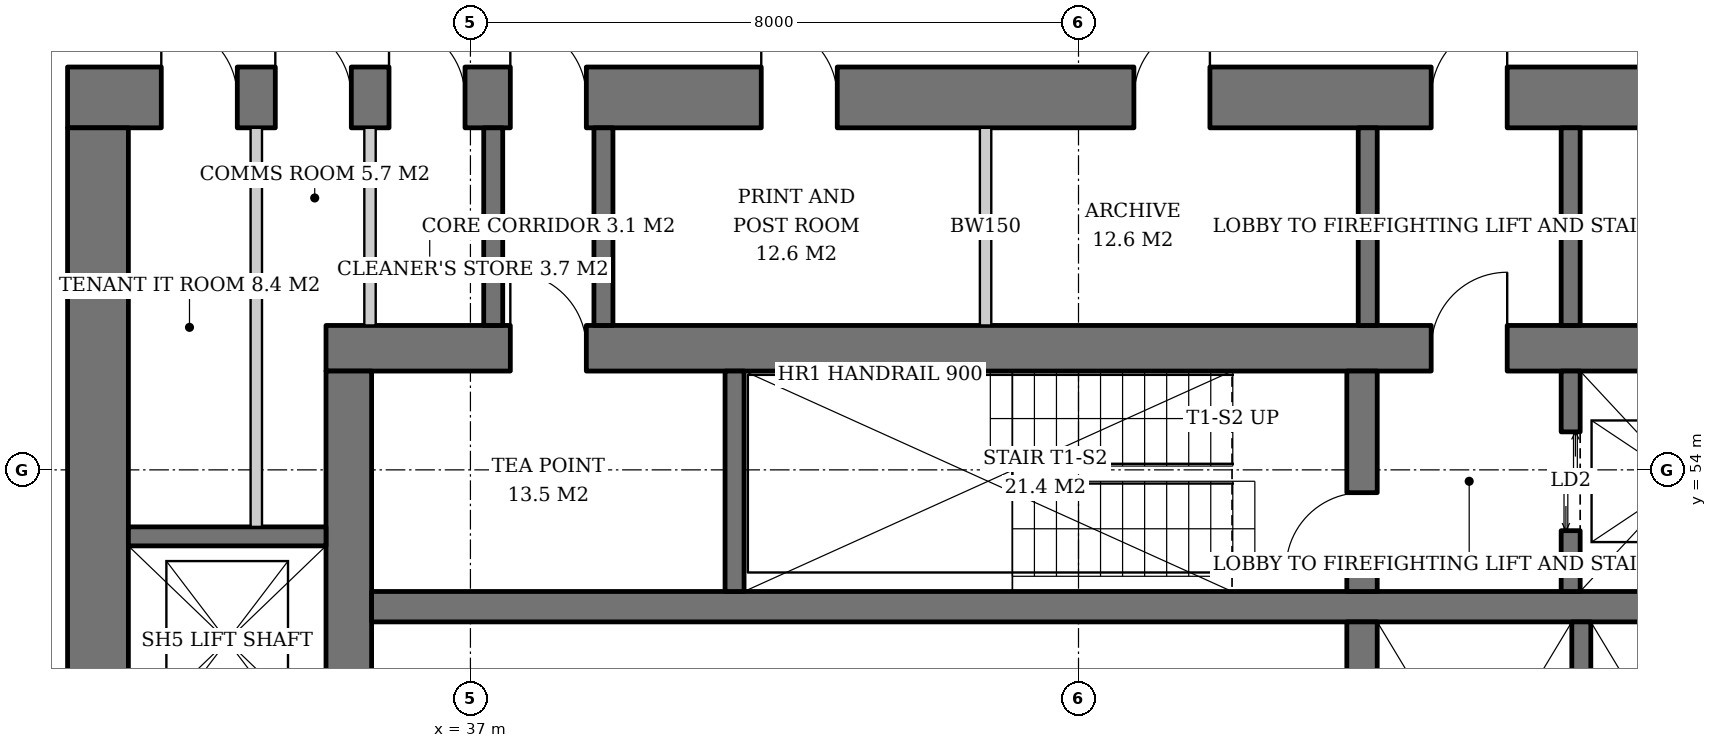
"""IFC4 building model, lengths in metres.
Left out: names, types, materials, properties, quantities, classifications, styles, units other than length and angle.
Written with IfcOpenShell. Run it as: python <this file> out.ifc"""

import sys

from ifc_helpers import new_model, si_unit, direction, frame, frame_2d, origin, place, context, subcontext, project, spatial, rectangle, extrude, element, fill, save


model = new_model("IFC4")
c1 = context("Model", 3, precision=1e-05, world=origin(), true_north=direction((0.0, 1.0)))
c2 = subcontext(c1, "Body", "Model", "MODEL_VIEW")
j1 = project(units=[si_unit("LENGTHUNIT", "METRE"), si_unit("PLANEANGLEUNIT", "RADIAN")], contexts=[c1])
p1 = place(None, origin())
s1 = spatial("IfcSite", under=j1, at=p1, CompositionType="ELEMENT")
p2 = place(p1, origin())
s2 = spatial("IfcBuilding", under=s1, at=p2, CompositionType="ELEMENT")
p3 = place(p2, frame((0.0, 0.0, 47.6)))
s3 = spatial("IfcBuildingStorey", under=s2, at=p3, CompositionType="ELEMENT", Elevation=47.6)
p4 = place(p3, frame((35.1, 55.6, 0.0), z_axis=(0.0, 0.0, 1.0), x_axis=(1.0, 0.0, 0.0)))
e1 = element("IfcWall", 1, at=p4, inside=s3, PredefinedType="SHEAR", context=c2, shape_type="SweptSolid", body=[
    extrude(rectangle(XDim=19.8, YDim=0.6, at=frame_2d((9.9, 0.0))), origin(), (0.0, 0.0, 1.0), 3.8),
])
p5 = place(p4, frame((14.54, 0.0, 0.0)))
e2 = element("IfcOpeningElement", 2, at=p5, cuts=e1, PredefinedType="OPENING", context=c2, shape_type="SweptSolid", body=[
    extrude(rectangle(XDim=1.0, YDim=2.1, at=frame_2d((0.5, 1.05))), frame((0.0, 0.31, 0.0), z_axis=(0.0, -1.0, 0.0), x_axis=(1.0, 0.0, 0.0)), (0.0, 0.0, 1.0), 0.62),
])
p6 = place(p4, frame((2.425, 0.0, 0.0)))
e3 = element("IfcOpeningElement", 3, at=p6, cuts=e1, PredefinedType="OPENING", context=c2, shape_type="SweptSolid", body=[
    extrude(rectangle(XDim=1.0, YDim=2.1, at=frame_2d((0.5, 1.05))), frame((0.0, 0.31, 0.0), z_axis=(0.0, -1.0, 0.0), x_axis=(1.0, 0.0, 0.0)), (0.0, 0.0, 1.0), 0.62),
])
p7 = place(p3, frame((35.4, 36.7, 0.0), z_axis=(0.0, 0.0, 1.0), x_axis=(0.0, 1.0, 0.0)))
e4 = element("IfcWall", 4, at=p7, inside=s3, PredefinedType="SHEAR", context=c2, shape_type="SweptSolid", body=[
    extrude(rectangle(XDim=18.6, YDim=0.6, at=frame_2d((9.3, 0.0))), origin(), (0.0, 0.0, 1.0), 3.8),
])
p8 = place(p7, frame((8.4, 0.0, 0.0)))
e5 = element("IfcOpeningElement", 5, at=p8, cuts=e4, PredefinedType="OPENING", context=c2, shape_type="SweptSolid", body=[
    extrude(rectangle(XDim=1.8, YDim=2.4, at=frame_2d((0.9, 1.2))), frame((0.0, 0.31, 0.0), z_axis=(0.0, -1.0, 0.0), x_axis=(1.0, 0.0, 0.0)), (0.0, 0.0, 1.0), 0.62),
])
p9 = place(p3, frame((31.7, 58.9, 0.0), z_axis=(0.0, 0.0, 1.0), x_axis=(1.0, 0.0, 0.0)))
e6 = element("IfcWall", 6, at=p9, inside=s3, PredefinedType="SHEAR", context=c2, shape_type="SweptSolid", body=[
    extrude(rectangle(XDim=26.6, YDim=0.8, at=frame_2d((13.3, 0.0))), origin(), (0.0, 0.0, 1.0), 3.8),
])
p10 = place(p9, frame((17.94, 0.0, 0.0)))
e7 = element("IfcOpeningElement", 7, at=p10, cuts=e6, PredefinedType="OPENING", context=c2, shape_type="SweptSolid", body=[
    extrude(rectangle(XDim=1.0, YDim=2.1, at=frame_2d((0.5, 1.05))), frame((0.0, 0.41, 0.0), z_axis=(0.0, -1.0, 0.0), x_axis=(1.0, 0.0, 0.0)), (0.0, 0.0, 1.0), 0.82),
])
p11 = place(p9, frame((5.825, 0.0, 0.0)))
e8 = element("IfcOpeningElement", 8, at=p11, cuts=e6, PredefinedType="OPENING", context=c2, shape_type="SweptSolid", body=[
    extrude(rectangle(XDim=1.0, YDim=2.1, at=frame_2d((0.5, 1.05))), frame((0.0, 0.41, 0.0), z_axis=(0.0, -1.0, 0.0), x_axis=(1.0, 0.0, 0.0)), (0.0, 0.0, 1.0), 0.82),
])
p12 = place(p9, frame((1.233, 0.0, 0.0)))
e9 = element("IfcOpeningElement", 9, at=p12, cuts=e6, PredefinedType="OPENING", context=c2, shape_type="SweptSolid", body=[
    extrude(rectangle(XDim=1.0, YDim=2.1, at=frame_2d((0.5, 1.05))), frame((0.0, 0.41, 0.0), z_axis=(0.0, -1.0, 0.0), x_axis=(1.0, 0.0, 0.0)), (0.0, 0.0, 1.0), 0.82),
])
p13 = place(p9, frame((2.733, 0.0, 0.0)))
e10 = element("IfcOpeningElement", 10, at=p13, cuts=e6, PredefinedType="OPENING", context=c2, shape_type="SweptSolid", body=[
    extrude(rectangle(XDim=1.0, YDim=2.1, at=frame_2d((0.5, 1.05))), frame((0.0, 0.41, 0.0), z_axis=(0.0, -1.0, 0.0), x_axis=(1.0, 0.0, 0.0)), (0.0, 0.0, 1.0), 0.82),
])
p14 = place(p9, frame((4.229, 0.0, 0.0)))
e11 = element("IfcOpeningElement", 11, at=p14, cuts=e6, PredefinedType="OPENING", context=c2, shape_type="SweptSolid", body=[
    extrude(rectangle(XDim=1.0, YDim=2.1, at=frame_2d((0.5, 1.05))), frame((0.0, 0.41, 0.0), z_axis=(0.0, -1.0, 0.0), x_axis=(1.0, 0.0, 0.0)), (0.0, 0.0, 1.0), 0.82),
])
p15 = place(p9, frame((9.126, 0.0, 0.0)))
e12 = element("IfcOpeningElement", 12, at=p15, cuts=e6, PredefinedType="OPENING", context=c2, shape_type="SweptSolid", body=[
    extrude(rectangle(XDim=1.0, YDim=2.1, at=frame_2d((0.5, 1.05))), frame((0.0, 0.41, 0.0), z_axis=(0.0, -1.0, 0.0), x_axis=(1.0, 0.0, 0.0)), (0.0, 0.0, 1.0), 0.82),
])
p16 = place(p9, frame((14.029, 0.0, 0.0)))
e13 = element("IfcOpeningElement", 13, at=p16, cuts=e6, PredefinedType="OPENING", context=c2, shape_type="SweptSolid", body=[
    extrude(rectangle(XDim=1.0, YDim=2.1, at=frame_2d((0.5, 1.05))), frame((0.0, 0.41, 0.0), z_axis=(0.0, -1.0, 0.0), x_axis=(1.0, 0.0, 0.0)), (0.0, 0.0, 1.0), 0.82),
])
p17 = place(p9, frame((22.35, 0.0, 0.0)))
e14 = element("IfcOpeningElement", 14, at=p17, cuts=e6, PredefinedType="OPENING", context=c2, shape_type="SweptSolid", body=[
    extrude(rectangle(XDim=1.0, YDim=2.1, at=frame_2d((0.5, 1.05))), frame((0.0, 0.41, 0.0), z_axis=(0.0, -1.0, 0.0), x_axis=(1.0, 0.0, 0.0)), (0.0, 0.0, 1.0), 0.82),
])
p18 = place(p3, frame((32.1, 33.5, 0.0), z_axis=(0.0, 0.0, 1.0), x_axis=(0.0, 1.0, 0.0)))
e15 = element("IfcWall", 15, at=p18, inside=s3, PredefinedType="SHEAR", context=c2, shape_type="SweptSolid", body=[
    extrude(rectangle(XDim=25.0, YDim=0.8, at=frame_2d((12.5, 0.0))), origin(), (0.0, 0.0, 1.0), 3.8),
])
p19 = place(p18, frame((11.6, 0.0, 0.0)))
e16 = element("IfcOpeningElement", 16, at=p19, cuts=e15, PredefinedType="OPENING", context=c2, shape_type="SweptSolid", body=[
    extrude(rectangle(XDim=1.8, YDim=2.4, at=frame_2d((0.9, 1.2))), frame((0.0, 0.41, 0.0), z_axis=(0.0, -1.0, 0.0), x_axis=(1.0, 0.0, 0.0)), (0.0, 0.0, 1.0), 0.82),
])
p20 = place(p3, frame((35.7, 52.2, 0.0), z_axis=(0.0, 0.0, 1.0), x_axis=(1.0, 0.0, 0.0)))
e17 = element("IfcWall", 17, at=p20, inside=s3, PredefinedType="SHEAR", context=c2, shape_type="SweptSolid", body=[
    extrude(rectangle(XDim=18.6, YDim=0.4, at=frame_2d((9.3, 0.0))), origin(), (0.0, 0.0, 1.0), 3.8),
])
p21 = place(p3, frame((48.73, 40.0, 0.0), z_axis=(0.0, 0.0, 1.0), x_axis=(0.0, 1.0, 0.0)))
e18 = element("IfcWall", 18, at=p21, inside=s3, PredefinedType="SHEAR", context=c2, shape_type="SweptSolid", body=[
    extrude(rectangle(XDim=12.0, YDim=0.4, at=frame_2d((6.0, 0.0))), origin(), (0.0, 0.0, 1.0), 3.8),
])
p22 = place(p3, frame((48.73, 52.4, 0.0), z_axis=(0.0, 0.0, 1.0), x_axis=(0.0, 1.0, 0.0)))
e19 = element("IfcWall", 19, at=p22, inside=s3, PredefinedType="SHEAR", context=c2, shape_type="SweptSolid", body=[
    extrude(rectangle(XDim=2.9, YDim=0.4, at=frame_2d((1.45, 0.0))), origin(), (0.0, 0.0, 1.0), 3.8),
])
p23 = place(p22, frame((0.3, 0.0, 0.0)))
e20 = element("IfcOpeningElement", 20, at=p23, cuts=e19, PredefinedType="OPENING", context=c2, shape_type="SweptSolid", body=[
    extrude(rectangle(XDim=1.0, YDim=2.1, at=frame_2d((0.5, 1.05))), frame((0.0, 0.21, 0.0), z_axis=(0.0, -1.0, 0.0), x_axis=(1.0, 0.0, 0.0)), (0.0, 0.0, 1.0), 0.42),
])
p24 = place(p3, frame((40.475, 52.4, 0.0), z_axis=(0.0, 0.0, 1.0), x_axis=(0.0, 1.0, 0.0)))
e21 = element("IfcWall", 21, at=p24, inside=s3, PredefinedType="SHEAR", context=c2, shape_type="SweptSolid", body=[
    extrude(rectangle(XDim=2.9, YDim=0.25, at=frame_2d((1.45, 0.0))), origin(), (0.0, 0.0, 1.0), 3.8),
])
p25 = place(p3, frame((51.475, 52.4, 0.0), z_axis=(0.0, 0.0, 1.0), x_axis=(0.0, 1.0, 0.0)))
e22 = element("IfcWall", 22, at=p25, inside=s3, PredefinedType="SHEAR", context=c2, shape_type="SweptSolid", body=[
    extrude(rectangle(XDim=2.9, YDim=0.25, at=frame_2d((1.45, 0.0))), origin(), (0.0, 0.0, 1.0), 3.8),
])
p26 = place(p25, frame((0.8, 0.0, 0.0)))
e23 = element("IfcOpeningElement", 23, at=p26, cuts=e22, PredefinedType="OPENING", context=c2, shape_type="SweptSolid", body=[
    extrude(rectangle(XDim=1.3, YDim=2.2, at=frame_2d((0.65, 1.1))), frame((0.0, 0.135, 0.0), z_axis=(0.0, -1.0, 0.0), x_axis=(1.0, 0.0, 0.0)), (0.0, 0.0, 1.0), 0.27),
])
p27 = place(p3, frame((51.615, 47.75, 0.0), z_axis=(0.0, 0.0, 1.0), x_axis=(0.0, 1.0, 0.0)))
e24 = element("IfcWall", 24, at=p27, inside=s3, PredefinedType="SHEAR", context=c2, shape_type="SweptSolid", body=[
    extrude(rectangle(XDim=4.25, YDim=0.25, at=frame_2d((2.125, 0.0))), origin(), (0.0, 0.0, 1.0), 3.8),
])
p28 = place(p3, frame((32.5, 53.125, 0.0), z_axis=(0.0, 0.0, 1.0), x_axis=(1.0, 0.0, 0.0)))
e25 = element("IfcWall", 25, at=p28, inside=s3, PredefinedType="SHEAR", context=c2, shape_type="SweptSolid", body=[
    extrude(rectangle(XDim=2.6, YDim=0.25, at=frame_2d((1.3, 0.0))), origin(), (0.0, 0.0, 1.0), 3.8),
])
for number, where, z_axis, x_axis in (
    (26, (48.805, 55.9, 0.0), (0.0, 0.0, 1.0), (0.0, 1.0, 0.0)),
    (27, (51.475, 55.9, 0.0), (0.0, 0.0, 1.0), (0.0, 1.0, 0.0)),
    (28, (37.3, 55.9, 0.0), (0.0, 0.0, 1.0), (0.0, 1.0, 0.0)),
    (29, (38.75, 55.9, 0.0), (0.0, 0.0, 1.0), (0.0, 1.0, 0.0)),
):
    element("IfcWall", number, at=place(p3, frame(where, z_axis=z_axis, x_axis=x_axis)), inside=s3, PredefinedType="SOLIDWALL", context=c2, shape_type="SweptSolid", body=[
        extrude(rectangle(XDim=2.6, YDim=0.25, at=frame_2d((1.3, 0.0))), origin(), (0.0, 0.0, 1.0), 3.62),
    ])
p29 = place(p3, frame((34.183, 53.25, 0.0), z_axis=(0.0, 0.0, 1.0), x_axis=(0.0, 1.0, 0.0)))
e30 = element("IfcWall", 30, at=p29, inside=s3, PredefinedType="SOLIDWALL", context=c2, shape_type="SweptSolid", body=[
    extrude(rectangle(XDim=5.25, YDim=0.15, at=frame_2d((2.625, 0.0))), origin(), (0.0, 0.0, 1.0), 3.62),
])
for number, where, z_axis, x_axis in (
    (31, (35.679, 55.9, 0.0), (0.0, 0.0, 1.0), (0.0, 1.0, 0.0)),
    (32, (43.778, 55.9, 0.0), (0.0, 0.0, 1.0), (0.0, 1.0, 0.0)),
):
    element("IfcWall", number, at=place(p3, frame(where, z_axis=z_axis, x_axis=x_axis)), inside=s3, PredefinedType="SOLIDWALL", context=c2, shape_type="SweptSolid", body=[
        extrude(rectangle(XDim=2.6, YDim=0.15, at=frame_2d((1.3, 0.0))), origin(), (0.0, 0.0, 1.0), 3.62),
    ])
p30 = place(p26, origin())
e33 = element("IfcDoor", 33, at=p30, inside=s3, OperationType="DOUBLE_DOOR_SLIDING", PredefinedType="DOOR", context=c2, shape_type="SweptSolid", body=[
    extrude(rectangle(XDim=1.3, YDim=2.2, at=frame_2d((0.65, 1.1))), frame((0.0, 0.025, 0.0), z_axis=(0.0, -1.0, 0.0), x_axis=(1.0, 0.0, 0.0)), (0.0, 0.0, 1.0), 0.05),
])
fill(e23, e33)
p31 = place(p23, origin())
e34 = element("IfcDoor", 34, at=p31, inside=s3, OperationType="SINGLE_SWING_LEFT", PredefinedType="DOOR", context=c2, shape_type="SweptSolid", body=[
    extrude(rectangle(XDim=1.0, YDim=2.1, at=frame_2d((0.5, 1.05))), frame((0.0, 0.025, 0.0), z_axis=(0.0, -1.0, 0.0), x_axis=(1.0, 0.0, 0.0)), (0.0, 0.0, 1.0), 0.05),
])
fill(e20, e34)
p32 = place(p5, origin())
e35 = element("IfcDoor", 35, at=p32, inside=s3, OperationType="SINGLE_SWING_RIGHT", PredefinedType="DOOR", context=c2, shape_type="SweptSolid", body=[
    extrude(rectangle(XDim=1.0, YDim=2.1, at=frame_2d((0.5, 1.05))), frame((0.0, 0.025, 0.0), z_axis=(0.0, -1.0, 0.0), x_axis=(1.0, 0.0, 0.0)), (0.0, 0.0, 1.0), 0.05),
])
fill(e2, e35)
p33 = place(p10, origin())
e36 = element("IfcDoor", 36, at=p33, inside=s3, OperationType="SINGLE_SWING_RIGHT", PredefinedType="DOOR", context=c2, shape_type="SweptSolid", body=[
    extrude(rectangle(XDim=1.0, YDim=2.1, at=frame_2d((0.5, 1.05))), frame((0.0, 0.025, 0.0), z_axis=(0.0, -1.0, 0.0), x_axis=(1.0, 0.0, 0.0)), (0.0, 0.0, 1.0), 0.05),
])
fill(e7, e36)
p34 = place(p11, origin())
e37 = element("IfcDoor", 37, at=p34, inside=s3, OperationType="SINGLE_SWING_LEFT", PredefinedType="DOOR", context=c2, shape_type="SweptSolid", body=[
    extrude(rectangle(XDim=1.0, YDim=2.1, at=frame_2d((0.5, 1.05))), frame((0.0, 0.025, 0.0), z_axis=(0.0, -1.0, 0.0), x_axis=(1.0, 0.0, 0.0)), (0.0, 0.0, 1.0), 0.05),
])
fill(e8, e37)
p35 = place(p6, origin())
e38 = element("IfcDoor", 38, at=p35, inside=s3, OperationType="SINGLE_SWING_LEFT", PredefinedType="DOOR", context=c2, shape_type="SweptSolid", body=[
    extrude(rectangle(XDim=1.0, YDim=2.1, at=frame_2d((0.5, 1.05))), frame((0.0, -0.24, 0.0), z_axis=(0.0, -1.0, 0.0), x_axis=(1.0, 0.0, 0.0)), (0.0, 0.0, 1.0), 0.05),
])
fill(e3, e38)
p36 = place(p12, origin())
e39 = element("IfcDoor", 39, at=p36, inside=s3, OperationType="SINGLE_SWING_LEFT", PredefinedType="DOOR", context=c2, shape_type="SweptSolid", body=[
    extrude(rectangle(XDim=1.0, YDim=2.1, at=frame_2d((0.5, 1.05))), frame((0.0, -0.34, 0.0), z_axis=(0.0, -1.0, 0.0), x_axis=(1.0, 0.0, 0.0)), (0.0, 0.0, 1.0), 0.05),
])
fill(e9, e39)
p37 = place(p13, origin())
e40 = element("IfcDoor", 40, at=p37, inside=s3, OperationType="SINGLE_SWING_LEFT", PredefinedType="DOOR", context=c2, shape_type="SweptSolid", body=[
    extrude(rectangle(XDim=1.0, YDim=2.1, at=frame_2d((0.5, 1.05))), frame((0.0, -0.34, 0.0), z_axis=(0.0, -1.0, 0.0), x_axis=(1.0, 0.0, 0.0)), (0.0, 0.0, 1.0), 0.05),
])
fill(e10, e40)
p38 = place(p14, origin())
e41 = element("IfcDoor", 41, at=p38, inside=s3, OperationType="SINGLE_SWING_LEFT", PredefinedType="DOOR", context=c2, shape_type="SweptSolid", body=[
    extrude(rectangle(XDim=1.0, YDim=2.1, at=frame_2d((0.5, 1.05))), frame((0.0, -0.34, 0.0), z_axis=(0.0, -1.0, 0.0), x_axis=(1.0, 0.0, 0.0)), (0.0, 0.0, 1.0), 0.05),
])
fill(e11, e41)
p39 = place(p15, origin())
e42 = element("IfcDoor", 42, at=p39, inside=s3, OperationType="SINGLE_SWING_LEFT", PredefinedType="DOOR", context=c2, shape_type="SweptSolid", body=[
    extrude(rectangle(XDim=1.0, YDim=2.1, at=frame_2d((0.5, 1.05))), frame((0.0, -0.34, 0.0), z_axis=(0.0, -1.0, 0.0), x_axis=(1.0, 0.0, 0.0)), (0.0, 0.0, 1.0), 0.05),
])
fill(e12, e42)
p40 = place(p16, origin())
e43 = element("IfcDoor", 43, at=p40, inside=s3, OperationType="SINGLE_SWING_RIGHT", PredefinedType="DOOR", context=c2, shape_type="SweptSolid", body=[
    extrude(rectangle(XDim=1.0, YDim=2.1, at=frame_2d((0.5, 1.05))), frame((0.0, -0.34, 0.0), z_axis=(0.0, -1.0, 0.0), x_axis=(1.0, 0.0, 0.0)), (0.0, 0.0, 1.0), 0.05),
])
fill(e13, e43)
save(model, sys.argv[1])
